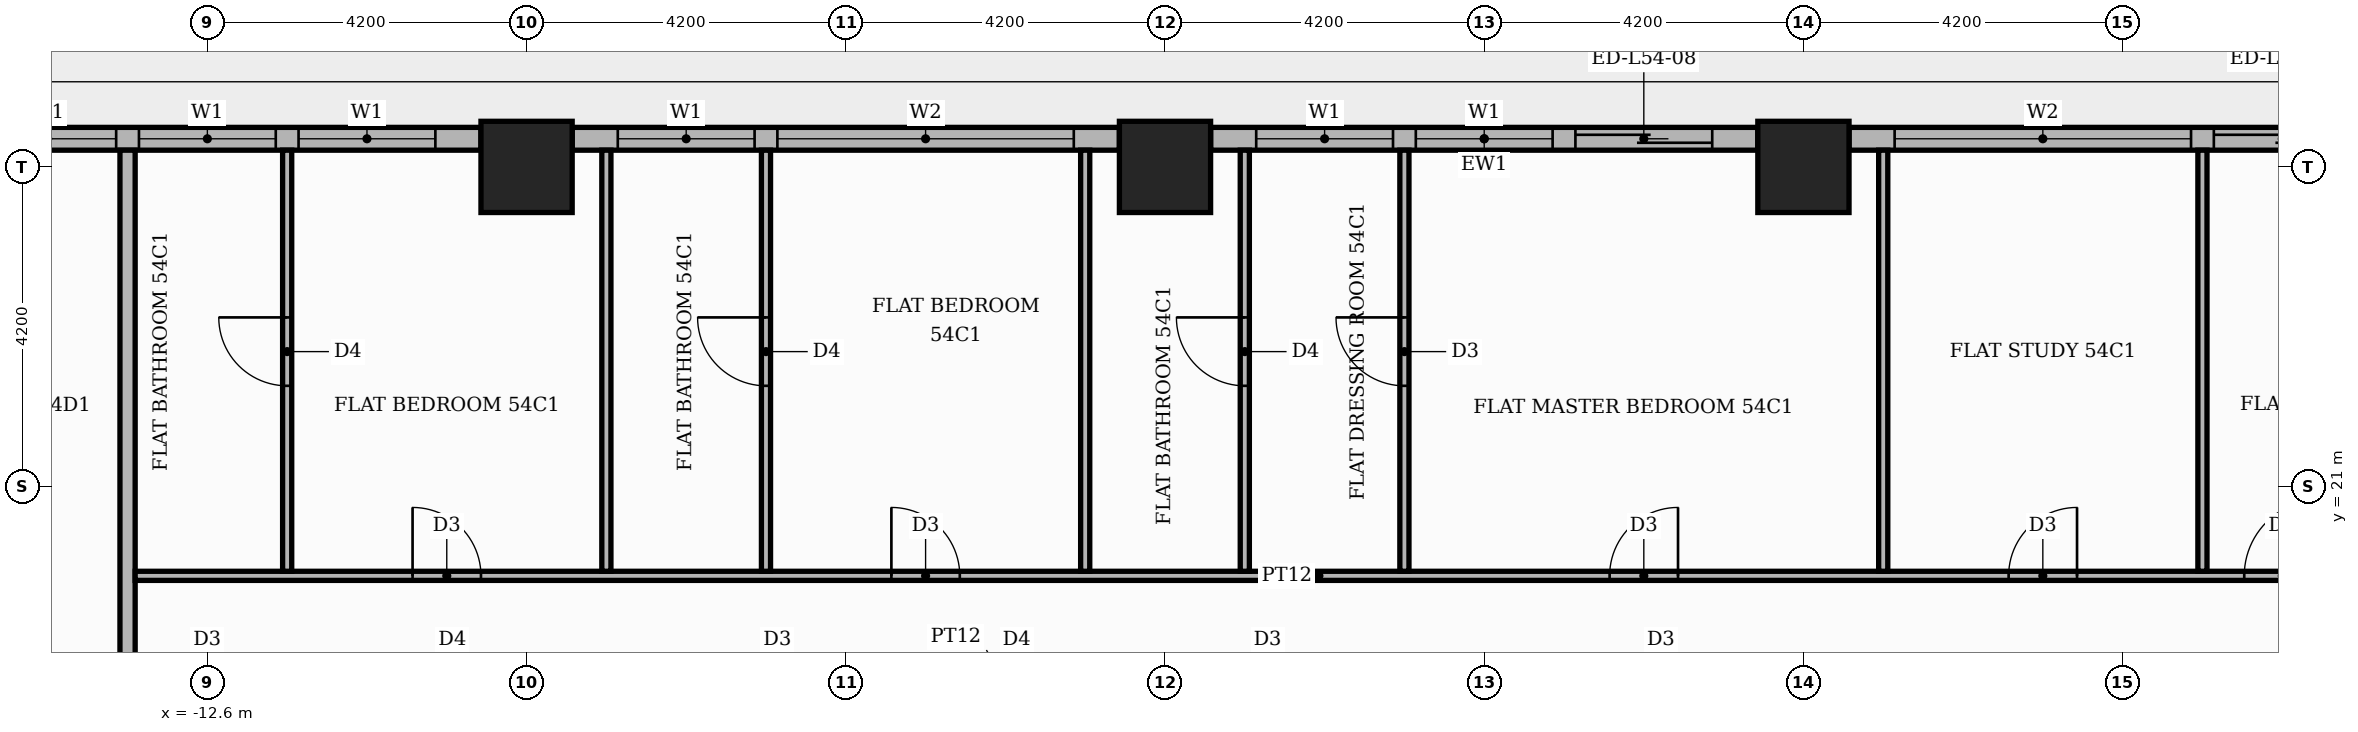
"""IFC4 building model, lengths in metres.
Left out: names, types, materials, properties, quantities, classifications, styles, units other than length and angle.
Written with IfcOpenShell. Run it as: python <this file> out.ifc"""

import sys

from ifc_helpers import new_model, si_unit, direction, frame, frame_2d, origin, origin_2d, place, context, subcontext, project, spatial, rectangle, extrude, element, fill, save


model = new_model("IFC4")
c1 = context("Model", 3, precision=1e-05, world=origin(), true_north=direction((0.0, 1.0)))
c2 = subcontext(c1, "Body", "Model", "MODEL_VIEW")
j1 = project(units=[si_unit("LENGTHUNIT", "METRE"), si_unit("PLANEANGLEUNIT", "RADIAN")], contexts=[c1])
p1 = place(None, origin())
s1 = spatial("IfcSite", under=j1, at=p1, CompositionType="ELEMENT")
p2 = place(p1, origin())
s2 = spatial("IfcBuilding", under=s1, at=p2, CompositionType="ELEMENT")
p3 = place(p2, frame((0.0, 0.0, 227.4)))
s3 = spatial("IfcBuildingStorey", under=s2, at=p3, CompositionType="ELEMENT", Elevation=227.4)
for number, where, z_axis, x_axis in (
    (1, (0.0, 25.2, 0.0), (0.0, 0.0, 1.0), (1.0, 0.0, 0.0)),
    (2, (-8.4, 25.2, 0.0), (0.0, 0.0, 1.0), (1.0, 0.0, 0.0)),
    (3, (8.4, 25.2, 0.0), (0.0, 0.0, 1.0), (1.0, 0.0, 0.0)),
):
    element("IfcColumn", number, at=place(p3, frame(where, z_axis=z_axis, x_axis=x_axis)), inside=s3, PredefinedType="COLUMN", context=c2, shape_type="SweptSolid", body=[
        extrude(rectangle(XDim=1.2, YDim=1.2, at=origin_2d()), origin(), (0.0, 0.0, 1.0), 3.9),
    ])
p4 = place(p3, frame((16.2, 25.57, 0.0), z_axis=(0.0, 0.0, 1.0), x_axis=(-1.0, 0.0, 0.0)))
e4 = element("IfcWall", 4, at=p4, inside=s3, PredefinedType="STANDARD", context=c2, shape_type="SweptSolid", body=[
    extrude(rectangle(XDim=7.2, YDim=0.3, at=frame_2d((3.6, 0.0))), origin(), (0.0, 0.0, 1.0), 3.48),
])
p5 = place(p4, frame((0.6, 0.0, 0.0)))
e5 = element("IfcOpeningElement", 5, at=p5, cuts=e4, PredefinedType="OPENING", context=c2, shape_type="SweptSolid", body=[
    extrude(rectangle(XDim=1.8, YDim=2.4, at=frame_2d((0.9, 1.2))), frame((0.0, 0.16, 0.0), z_axis=(0.0, -1.0, 0.0), x_axis=(1.0, 0.0, 0.0)), (0.0, 0.0, 1.0), 0.32),
])
p6 = place(p4, frame((2.7, 0.0, 0.9)))
e6 = element("IfcOpeningElement", 6, at=p6, cuts=e4, PredefinedType="OPENING", context=c2, shape_type="SweptSolid", body=[
    extrude(rectangle(XDim=3.9, YDim=2.1, at=frame_2d((1.95, 1.05))), frame((0.0, 0.16, 0.0), z_axis=(0.0, -1.0, 0.0), x_axis=(1.0, 0.0, 0.0)), (0.0, 0.0, 1.0), 0.32),
])
p7 = place(p3, frame((7.8, 25.57, 0.0), z_axis=(0.0, 0.0, 1.0), x_axis=(-1.0, 0.0, 0.0)))
e7 = element("IfcWall", 7, at=p7, inside=s3, PredefinedType="STANDARD", context=c2, shape_type="SweptSolid", body=[
    extrude(rectangle(XDim=7.2, YDim=0.3, at=frame_2d((3.6, 0.0))), origin(), (0.0, 0.0, 1.0), 3.48),
])
p8 = place(p7, frame((0.6, 0.0, 0.0)))
e8 = element("IfcOpeningElement", 8, at=p8, cuts=e7, PredefinedType="OPENING", context=c2, shape_type="SweptSolid", body=[
    extrude(rectangle(XDim=1.8, YDim=2.4, at=frame_2d((0.9, 1.2))), frame((0.0, 0.16, 0.0), z_axis=(0.0, -1.0, 0.0), x_axis=(1.0, 0.0, 0.0)), (0.0, 0.0, 1.0), 0.32),
])
p9 = place(p7, frame((2.7, 0.0, 0.9)))
e9 = element("IfcOpeningElement", 9, at=p9, cuts=e7, PredefinedType="OPENING", context=c2, shape_type="SweptSolid", body=[
    extrude(rectangle(XDim=1.8, YDim=2.1, at=frame_2d((0.9, 1.05))), frame((0.0, 0.16, 0.0), z_axis=(0.0, -1.0, 0.0), x_axis=(1.0, 0.0, 0.0)), (0.0, 0.0, 1.0), 0.32),
])
p10 = place(p7, frame((4.8, 0.0, 0.9)))
e10 = element("IfcOpeningElement", 10, at=p10, cuts=e7, PredefinedType="OPENING", context=c2, shape_type="SweptSolid", body=[
    extrude(rectangle(XDim=1.8, YDim=2.1, at=frame_2d((0.9, 1.05))), frame((0.0, 0.16, 0.0), z_axis=(0.0, -1.0, 0.0), x_axis=(1.0, 0.0, 0.0)), (0.0, 0.0, 1.0), 0.32),
])
p11 = place(p3, frame((-0.6, 25.57, 0.0), z_axis=(0.0, 0.0, 1.0), x_axis=(-1.0, 0.0, 0.0)))
e11 = element("IfcWall", 11, at=p11, inside=s3, PredefinedType="STANDARD", context=c2, shape_type="SweptSolid", body=[
    extrude(rectangle(XDim=7.2, YDim=0.3, at=frame_2d((3.6, 0.0))), origin(), (0.0, 0.0, 1.0), 3.48),
])
p12 = place(p11, frame((0.6, 0.0, 0.9)))
e12 = element("IfcOpeningElement", 12, at=p12, cuts=e11, PredefinedType="OPENING", context=c2, shape_type="SweptSolid", body=[
    extrude(rectangle(XDim=3.9, YDim=2.1, at=frame_2d((1.95, 1.05))), frame((0.0, 0.16, 0.0), z_axis=(0.0, -1.0, 0.0), x_axis=(1.0, 0.0, 0.0)), (0.0, 0.0, 1.0), 0.32),
])
p13 = place(p11, frame((4.8, 0.0, 0.9)))
e13 = element("IfcOpeningElement", 13, at=p13, cuts=e11, PredefinedType="OPENING", context=c2, shape_type="SweptSolid", body=[
    extrude(rectangle(XDim=1.8, YDim=2.1, at=frame_2d((0.9, 1.05))), frame((0.0, 0.16, 0.0), z_axis=(0.0, -1.0, 0.0), x_axis=(1.0, 0.0, 0.0)), (0.0, 0.0, 1.0), 0.32),
])
p14 = place(p3, frame((-9.0, 25.57, 0.0), z_axis=(0.0, 0.0, 1.0), x_axis=(-1.0, 0.0, 0.0)))
e14 = element("IfcWall", 14, at=p14, inside=s3, PredefinedType="STANDARD", context=c2, shape_type="SweptSolid", body=[
    extrude(rectangle(XDim=7.2, YDim=0.3, at=frame_2d((3.6, 0.0))), origin(), (0.0, 0.0, 1.0), 3.48),
])
p15 = place(p14, frame((0.6, 0.0, 0.9)))
e15 = element("IfcOpeningElement", 15, at=p15, cuts=e14, PredefinedType="OPENING", context=c2, shape_type="SweptSolid", body=[
    extrude(rectangle(XDim=1.8, YDim=2.1, at=frame_2d((0.9, 1.05))), frame((0.0, 0.16, 0.0), z_axis=(0.0, -1.0, 0.0), x_axis=(1.0, 0.0, 0.0)), (0.0, 0.0, 1.0), 0.32),
])
p16 = place(p14, frame((2.7, 0.0, 0.9)))
e16 = element("IfcOpeningElement", 16, at=p16, cuts=e14, PredefinedType="OPENING", context=c2, shape_type="SweptSolid", body=[
    extrude(rectangle(XDim=1.8, YDim=2.1, at=frame_2d((0.9, 1.05))), frame((0.0, 0.16, 0.0), z_axis=(0.0, -1.0, 0.0), x_axis=(1.0, 0.0, 0.0)), (0.0, 0.0, 1.0), 0.32),
])
p17 = place(p14, frame((4.8, 0.0, 0.9)))
e17 = element("IfcOpeningElement", 17, at=p17, cuts=e14, PredefinedType="OPENING", context=c2, shape_type="SweptSolid", body=[
    extrude(rectangle(XDim=1.8, YDim=2.1, at=frame_2d((0.9, 1.05))), frame((0.0, 0.16, 0.0), z_axis=(0.0, -1.0, 0.0), x_axis=(1.0, 0.0, 0.0)), (0.0, 0.0, 1.0), 0.32),
])
p18 = place(p3, frame((-13.65, 13.75, 0.0), z_axis=(0.0, 0.0, 1.0), x_axis=(0.0, 1.0, 0.0)))
e18 = element("IfcWall", 18, at=p18, inside=s3, PredefinedType="PARTITIONING", context=c2, shape_type="SweptSolid", body=[
    extrude(rectangle(XDim=11.67, YDim=0.2, at=frame_2d((5.835, 0.0))), origin(), (0.0, 0.0, 1.0), 3.48),
])
p19 = place(p3, frame((-13.55, 19.82, 0.0), z_axis=(0.0, 0.0, 1.0), x_axis=(1.0, 0.0, 0.0)))
e19 = element("IfcWall", 19, at=p19, inside=s3, PredefinedType="PARTITIONING", context=c2, shape_type="SweptSolid", body=[
    extrude(rectangle(XDim=31.15, YDim=0.12, at=frame_2d((15.575, 0.0))), origin(), (0.0, 0.0, 1.0), 3.48),
])
p20 = place(p19, frame((27.75, 0.0, 0.0)))
e20 = element("IfcOpeningElement", 20, at=p20, cuts=e19, PredefinedType="OPENING", context=c2, shape_type="SweptSolid", body=[
    extrude(rectangle(XDim=1.0, YDim=2.1, at=frame_2d((0.5, 1.05))), frame((0.0, 0.07, 0.0), z_axis=(0.0, -1.0, 0.0), x_axis=(1.0, 0.0, 0.0)), (0.0, 0.0, 1.0), 0.14),
])
p21 = place(p19, frame((24.65, 0.0, 0.0)))
e21 = element("IfcOpeningElement", 21, at=p21, cuts=e19, PredefinedType="OPENING", context=c2, shape_type="SweptSolid", body=[
    extrude(rectangle(XDim=0.9, YDim=2.1, at=frame_2d((0.45, 1.05))), frame((0.0, 0.07, 0.0), z_axis=(0.0, -1.0, 0.0), x_axis=(1.0, 0.0, 0.0)), (0.0, 0.0, 1.0), 0.14),
])
p22 = place(p19, frame((19.4, 0.0, 0.0)))
e22 = element("IfcOpeningElement", 22, at=p22, cuts=e19, PredefinedType="OPENING", context=c2, shape_type="SweptSolid", body=[
    extrude(rectangle(XDim=0.9, YDim=2.1, at=frame_2d((0.45, 1.05))), frame((0.0, 0.07, 0.0), z_axis=(0.0, -1.0, 0.0), x_axis=(1.0, 0.0, 0.0)), (0.0, 0.0, 1.0), 0.14),
])
p23 = place(p19, frame((9.95, 0.0, 0.0)))
e23 = element("IfcOpeningElement", 23, at=p23, cuts=e19, PredefinedType="OPENING", context=c2, shape_type="SweptSolid", body=[
    extrude(rectangle(XDim=0.9, YDim=2.1, at=frame_2d((0.45, 1.05))), frame((0.0, 0.07, 0.0), z_axis=(0.0, -1.0, 0.0), x_axis=(1.0, 0.0, 0.0)), (0.0, 0.0, 1.0), 0.14),
])
p24 = place(p19, frame((3.65, 0.0, 0.0)))
e24 = element("IfcOpeningElement", 24, at=p24, cuts=e19, PredefinedType="OPENING", context=c2, shape_type="SweptSolid", body=[
    extrude(rectangle(XDim=0.9, YDim=2.1, at=frame_2d((0.45, 1.05))), frame((0.0, 0.07, 0.0), z_axis=(0.0, -1.0, 0.0), x_axis=(1.0, 0.0, 0.0)), (0.0, 0.0, 1.0), 0.14),
])
p25 = place(p3, frame((-11.55, 19.88, 0.0), z_axis=(0.0, 0.0, 1.0), x_axis=(0.0, 1.0, 0.0)))
e25 = element("IfcWall", 25, at=p25, inside=s3, PredefinedType="PARTITIONING", context=c2, shape_type="SweptSolid", body=[
    extrude(rectangle(XDim=5.54, YDim=0.12, at=frame_2d((2.77, 0.0))), origin(), (0.0, 0.0, 1.0), 3.48),
])
p26 = place(p25, frame((2.44, 0.0, 0.0)))
e26 = element("IfcOpeningElement", 26, at=p26, cuts=e25, PredefinedType="OPENING", context=c2, shape_type="SweptSolid", body=[
    extrude(rectangle(XDim=0.9, YDim=2.1, at=frame_2d((0.45, 1.05))), frame((0.0, 0.07, 0.0), z_axis=(0.0, -1.0, 0.0), x_axis=(1.0, 0.0, 0.0)), (0.0, 0.0, 1.0), 0.14),
])
p27 = place(p3, frame((-7.35, 19.88, 0.0), z_axis=(0.0, 0.0, 1.0), x_axis=(0.0, 1.0, 0.0)))
e27 = element("IfcWall", 27, at=p27, inside=s3, PredefinedType="PARTITIONING", context=c2, shape_type="SweptSolid", body=[
    extrude(rectangle(XDim=5.54, YDim=0.12, at=frame_2d((2.77, 0.0))), origin(), (0.0, 0.0, 1.0), 3.48),
])
p28 = place(p3, frame((-5.25, 19.88, 0.0), z_axis=(0.0, 0.0, 1.0), x_axis=(0.0, 1.0, 0.0)))
e28 = element("IfcWall", 28, at=p28, inside=s3, PredefinedType="PARTITIONING", context=c2, shape_type="SweptSolid", body=[
    extrude(rectangle(XDim=5.54, YDim=0.12, at=frame_2d((2.77, 0.0))), origin(), (0.0, 0.0, 1.0), 3.48),
])
p29 = place(p28, frame((2.44, 0.0, 0.0)))
e29 = element("IfcOpeningElement", 29, at=p29, cuts=e28, PredefinedType="OPENING", context=c2, shape_type="SweptSolid", body=[
    extrude(rectangle(XDim=0.9, YDim=2.1, at=frame_2d((0.45, 1.05))), frame((0.0, 0.07, 0.0), z_axis=(0.0, -1.0, 0.0), x_axis=(1.0, 0.0, 0.0)), (0.0, 0.0, 1.0), 0.14),
])
p30 = place(p3, frame((-1.05, 19.88, 0.0), z_axis=(0.0, 0.0, 1.0), x_axis=(0.0, 1.0, 0.0)))
e30 = element("IfcWall", 30, at=p30, inside=s3, PredefinedType="PARTITIONING", context=c2, shape_type="SweptSolid", body=[
    extrude(rectangle(XDim=5.54, YDim=0.12, at=frame_2d((2.77, 0.0))), origin(), (0.0, 0.0, 1.0), 3.48),
])
p31 = place(p3, frame((1.05, 19.88, 0.0), z_axis=(0.0, 0.0, 1.0), x_axis=(0.0, 1.0, 0.0)))
e31 = element("IfcWall", 31, at=p31, inside=s3, PredefinedType="PARTITIONING", context=c2, shape_type="SweptSolid", body=[
    extrude(rectangle(XDim=5.54, YDim=0.12, at=frame_2d((2.77, 0.0))), origin(), (0.0, 0.0, 1.0), 3.48),
])
p32 = place(p31, frame((2.44, 0.0, 0.0)))
e32 = element("IfcOpeningElement", 32, at=p32, cuts=e31, PredefinedType="OPENING", context=c2, shape_type="SweptSolid", body=[
    extrude(rectangle(XDim=0.9, YDim=2.1, at=frame_2d((0.45, 1.05))), frame((0.0, 0.07, 0.0), z_axis=(0.0, -1.0, 0.0), x_axis=(1.0, 0.0, 0.0)), (0.0, 0.0, 1.0), 0.14),
])
p33 = place(p3, frame((3.15, 19.88, 0.0), z_axis=(0.0, 0.0, 1.0), x_axis=(0.0, 1.0, 0.0)))
e33 = element("IfcWall", 33, at=p33, inside=s3, PredefinedType="PARTITIONING", context=c2, shape_type="SweptSolid", body=[
    extrude(rectangle(XDim=5.54, YDim=0.12, at=frame_2d((2.77, 0.0))), origin(), (0.0, 0.0, 1.0), 3.48),
])
p34 = place(p33, frame((2.44, 0.0, 0.0)))
e34 = element("IfcOpeningElement", 34, at=p34, cuts=e33, PredefinedType="OPENING", context=c2, shape_type="SweptSolid", body=[
    extrude(rectangle(XDim=0.9, YDim=2.1, at=frame_2d((0.45, 1.05))), frame((0.0, 0.07, 0.0), z_axis=(0.0, -1.0, 0.0), x_axis=(1.0, 0.0, 0.0)), (0.0, 0.0, 1.0), 0.14),
])
for number, where, z_axis, x_axis in (
    (35, (9.45, 19.88, 0.0), (0.0, 0.0, 1.0), (0.0, 1.0, 0.0)),
    (36, (13.65, 19.88, 0.0), (0.0, 0.0, 1.0), (0.0, 1.0, 0.0)),
):
    element("IfcWall", number, at=place(p3, frame(where, z_axis=z_axis, x_axis=x_axis)), inside=s3, PredefinedType="PARTITIONING", context=c2, shape_type="SweptSolid", body=[
        extrude(rectangle(XDim=5.54, YDim=0.12, at=frame_2d((2.77, 0.0))), origin(), (0.0, 0.0, 1.0), 3.48),
    ])
p35 = place(p5, origin())
e37 = element("IfcDoor", 37, at=p35, inside=s3, OperationType="SLIDING_TO_LEFT", PredefinedType="DOOR", context=c2, shape_type="SweptSolid", body=[
    extrude(rectangle(XDim=1.8, YDim=2.4, at=frame_2d((0.9, 1.2))), frame((0.0, 0.025, 0.0), z_axis=(0.0, -1.0, 0.0), x_axis=(1.0, 0.0, 0.0)), (0.0, 0.0, 1.0), 0.05),
])
fill(e5, e37)
p36 = place(p6, origin())
e38 = element("IfcWindow", 38, at=p36, inside=s3, PartitioningType="SINGLE_PANEL", PredefinedType="WINDOW", context=c2, shape_type="SweptSolid", body=[
    extrude(rectangle(XDim=3.9, YDim=2.1, at=frame_2d((1.95, 1.05))), frame((0.0, 0.03, 0.0), z_axis=(0.0, -1.0, 0.0), x_axis=(1.0, 0.0, 0.0)), (0.0, 0.0, 1.0), 0.06),
])
fill(e6, e38)
p37 = place(p8, origin())
e39 = element("IfcDoor", 39, at=p37, inside=s3, OperationType="SLIDING_TO_LEFT", PredefinedType="DOOR", context=c2, shape_type="SweptSolid", body=[
    extrude(rectangle(XDim=1.8, YDim=2.4, at=frame_2d((0.9, 1.2))), frame((0.0, 0.025, 0.0), z_axis=(0.0, -1.0, 0.0), x_axis=(1.0, 0.0, 0.0)), (0.0, 0.0, 1.0), 0.05),
])
fill(e8, e39)
p38 = place(p9, origin())
e40 = element("IfcWindow", 40, at=p38, inside=s3, PartitioningType="SINGLE_PANEL", PredefinedType="WINDOW", context=c2, shape_type="SweptSolid", body=[
    extrude(rectangle(XDim=1.8, YDim=2.1, at=frame_2d((0.9, 1.05))), frame((0.0, 0.03, 0.0), z_axis=(0.0, -1.0, 0.0), x_axis=(1.0, 0.0, 0.0)), (0.0, 0.0, 1.0), 0.06),
])
fill(e9, e40)
p39 = place(p10, origin())
e41 = element("IfcWindow", 41, at=p39, inside=s3, PartitioningType="SINGLE_PANEL", PredefinedType="WINDOW", context=c2, shape_type="SweptSolid", body=[
    extrude(rectangle(XDim=1.8, YDim=2.1, at=frame_2d((0.9, 1.05))), frame((0.0, 0.03, 0.0), z_axis=(0.0, -1.0, 0.0), x_axis=(1.0, 0.0, 0.0)), (0.0, 0.0, 1.0), 0.06),
])
fill(e10, e41)
p40 = place(p12, origin())
e42 = element("IfcWindow", 42, at=p40, inside=s3, PartitioningType="SINGLE_PANEL", PredefinedType="WINDOW", context=c2, shape_type="SweptSolid", body=[
    extrude(rectangle(XDim=3.9, YDim=2.1, at=frame_2d((1.95, 1.05))), frame((0.0, 0.03, 0.0), z_axis=(0.0, -1.0, 0.0), x_axis=(1.0, 0.0, 0.0)), (0.0, 0.0, 1.0), 0.06),
])
fill(e12, e42)
p41 = place(p13, origin())
e43 = element("IfcWindow", 43, at=p41, inside=s3, PartitioningType="SINGLE_PANEL", PredefinedType="WINDOW", context=c2, shape_type="SweptSolid", body=[
    extrude(rectangle(XDim=1.8, YDim=2.1, at=frame_2d((0.9, 1.05))), frame((0.0, 0.03, 0.0), z_axis=(0.0, -1.0, 0.0), x_axis=(1.0, 0.0, 0.0)), (0.0, 0.0, 1.0), 0.06),
])
fill(e13, e43)
p42 = place(p15, origin())
e44 = element("IfcWindow", 44, at=p42, inside=s3, PartitioningType="SINGLE_PANEL", PredefinedType="WINDOW", context=c2, shape_type="SweptSolid", body=[
    extrude(rectangle(XDim=1.8, YDim=2.1, at=frame_2d((0.9, 1.05))), frame((0.0, 0.03, 0.0), z_axis=(0.0, -1.0, 0.0), x_axis=(1.0, 0.0, 0.0)), (0.0, 0.0, 1.0), 0.06),
])
fill(e15, e44)
p43 = place(p16, origin())
e45 = element("IfcWindow", 45, at=p43, inside=s3, PartitioningType="SINGLE_PANEL", PredefinedType="WINDOW", context=c2, shape_type="SweptSolid", body=[
    extrude(rectangle(XDim=1.8, YDim=2.1, at=frame_2d((0.9, 1.05))), frame((0.0, 0.03, 0.0), z_axis=(0.0, -1.0, 0.0), x_axis=(1.0, 0.0, 0.0)), (0.0, 0.0, 1.0), 0.06),
])
fill(e16, e45)
p44 = place(p17, origin())
e46 = element("IfcWindow", 46, at=p44, inside=s3, PartitioningType="SINGLE_PANEL", PredefinedType="WINDOW", context=c2, shape_type="SweptSolid", body=[
    extrude(rectangle(XDim=1.8, YDim=2.1, at=frame_2d((0.9, 1.05))), frame((0.0, 0.03, 0.0), z_axis=(0.0, -1.0, 0.0), x_axis=(1.0, 0.0, 0.0)), (0.0, 0.0, 1.0), 0.06),
])
fill(e17, e46)
p45 = place(p20, origin())
e47 = element("IfcDoor", 47, at=p45, inside=s3, OperationType="SINGLE_SWING_RIGHT", PredefinedType="DOOR", context=c2, shape_type="SweptSolid", body=[
    extrude(rectangle(XDim=1.0, YDim=2.1, at=frame_2d((0.5, 1.05))), frame((0.0, 0.025, 0.0), z_axis=(0.0, -1.0, 0.0), x_axis=(1.0, 0.0, 0.0)), (0.0, 0.0, 1.0), 0.05),
])
fill(e20, e47)
p46 = place(p21, origin())
e48 = element("IfcDoor", 48, at=p46, inside=s3, OperationType="SINGLE_SWING_RIGHT", PredefinedType="DOOR", context=c2, shape_type="SweptSolid", body=[
    extrude(rectangle(XDim=0.9, YDim=2.1, at=frame_2d((0.45, 1.05))), frame((0.0, 0.025, 0.0), z_axis=(0.0, -1.0, 0.0), x_axis=(1.0, 0.0, 0.0)), (0.0, 0.0, 1.0), 0.05),
])
fill(e21, e48)
p47 = place(p22, origin())
e49 = element("IfcDoor", 49, at=p47, inside=s3, OperationType="SINGLE_SWING_RIGHT", PredefinedType="DOOR", context=c2, shape_type="SweptSolid", body=[
    extrude(rectangle(XDim=0.9, YDim=2.1, at=frame_2d((0.45, 1.05))), frame((0.0, 0.025, 0.0), z_axis=(0.0, -1.0, 0.0), x_axis=(1.0, 0.0, 0.0)), (0.0, 0.0, 1.0), 0.05),
])
fill(e22, e49)
p48 = place(p34, origin())
e50 = element("IfcDoor", 50, at=p48, inside=s3, OperationType="SINGLE_SWING_RIGHT", PredefinedType="DOOR", context=c2, shape_type="SweptSolid", body=[
    extrude(rectangle(XDim=0.9, YDim=2.1, at=frame_2d((0.45, 1.05))), frame((0.0, 0.025, 0.0), z_axis=(0.0, -1.0, 0.0), x_axis=(1.0, 0.0, 0.0)), (0.0, 0.0, 1.0), 0.05),
])
fill(e34, e50)
p49 = place(p32, origin())
e51 = element("IfcDoor", 51, at=p49, inside=s3, OperationType="SINGLE_SWING_RIGHT", PredefinedType="DOOR", context=c2, shape_type="SweptSolid", body=[
    extrude(rectangle(XDim=0.9, YDim=2.1, at=frame_2d((0.45, 1.05))), frame((0.0, 0.025, 0.0), z_axis=(0.0, -1.0, 0.0), x_axis=(1.0, 0.0, 0.0)), (0.0, 0.0, 1.0), 0.05),
])
fill(e32, e51)
p50 = place(p23, origin())
e52 = element("IfcDoor", 52, at=p50, inside=s3, OperationType="SINGLE_SWING_LEFT", PredefinedType="DOOR", context=c2, shape_type="SweptSolid", body=[
    extrude(rectangle(XDim=0.9, YDim=2.1, at=frame_2d((0.45, 1.05))), frame((0.0, 0.025, 0.0), z_axis=(0.0, -1.0, 0.0), x_axis=(1.0, 0.0, 0.0)), (0.0, 0.0, 1.0), 0.05),
])
fill(e23, e52)
p51 = place(p29, origin())
e53 = element("IfcDoor", 53, at=p51, inside=s3, OperationType="SINGLE_SWING_RIGHT", PredefinedType="DOOR", context=c2, shape_type="SweptSolid", body=[
    extrude(rectangle(XDim=0.9, YDim=2.1, at=frame_2d((0.45, 1.05))), frame((0.0, 0.025, 0.0), z_axis=(0.0, -1.0, 0.0), x_axis=(1.0, 0.0, 0.0)), (0.0, 0.0, 1.0), 0.05),
])
fill(e29, e53)
p52 = place(p24, origin())
e54 = element("IfcDoor", 54, at=p52, inside=s3, OperationType="SINGLE_SWING_LEFT", PredefinedType="DOOR", context=c2, shape_type="SweptSolid", body=[
    extrude(rectangle(XDim=0.9, YDim=2.1, at=frame_2d((0.45, 1.05))), frame((0.0, 0.025, 0.0), z_axis=(0.0, -1.0, 0.0), x_axis=(1.0, 0.0, 0.0)), (0.0, 0.0, 1.0), 0.05),
])
fill(e24, e54)
p53 = place(p26, origin())
e55 = element("IfcDoor", 55, at=p53, inside=s3, OperationType="SINGLE_SWING_RIGHT", PredefinedType="DOOR", context=c2, shape_type="SweptSolid", body=[
    extrude(rectangle(XDim=0.9, YDim=2.1, at=frame_2d((0.45, 1.05))), frame((0.0, 0.025, 0.0), z_axis=(0.0, -1.0, 0.0), x_axis=(1.0, 0.0, 0.0)), (0.0, 0.0, 1.0), 0.05),
])
fill(e26, e55)
save(model, sys.argv[1])
